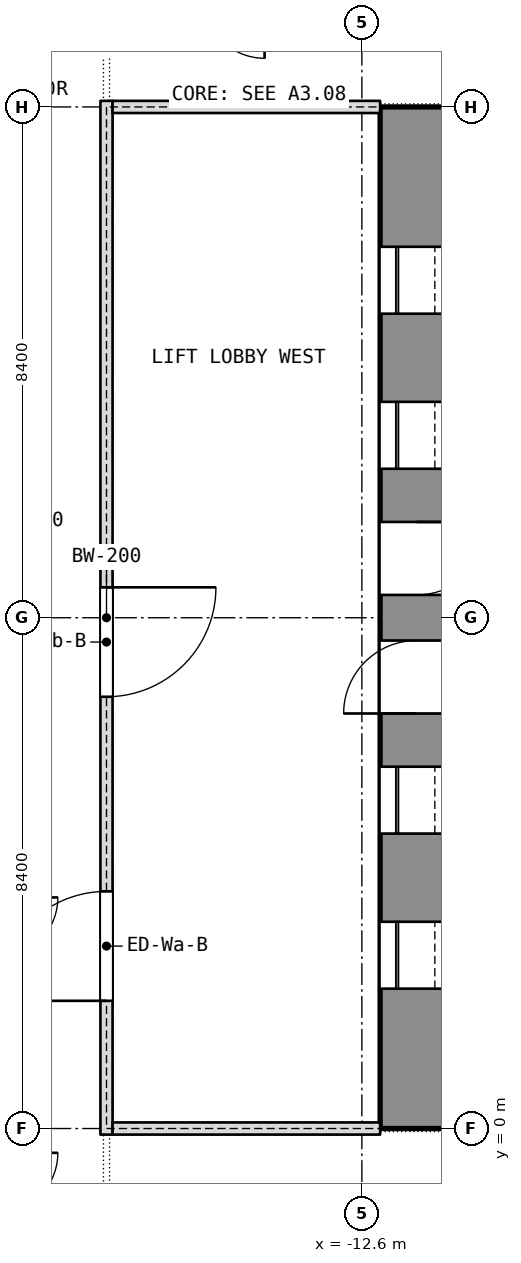
"""IFC4 building model, lengths in metres.
Left out: names, types, materials, properties, quantities, classifications, styles, units other than length and angle.
Written with IfcOpenShell. Run it as: python <this file> out.ifc"""

import sys

from ifc_helpers import new_model, si_unit, direction, frame, frame_2d, origin, place, context, subcontext, project, spatial, rectangle, extrude, element, fill, save


model = new_model("IFC4")
c1 = context("Model", 3, precision=1e-05, world=origin(), true_north=direction((0.0, 1.0)))
c2 = subcontext(c1, "Body", "Model", "MODEL_VIEW")
j1 = project(units=[si_unit("LENGTHUNIT", "METRE"), si_unit("PLANEANGLEUNIT", "RADIAN")], contexts=[c1])
p1 = place(None, origin())
s1 = spatial("IfcSite", under=j1, at=p1, CompositionType="ELEMENT")
p2 = place(p1, origin())
s2 = spatial("IfcBuilding", under=s1, at=p2, CompositionType="ELEMENT")
p3 = place(p2, frame((0.0, 0.0, 61.7)))
s3 = spatial("IfcBuildingStorey", under=s2, at=p3, CompositionType="ELEMENT", Elevation=61.7)
p4 = place(p3, frame((-11.7, 0.0, 0.0), z_axis=(0.0, 0.0, 1.0), x_axis=(0.0, 1.0, 0.0)))
e1 = element("IfcWall", 1, at=p4, inside=s3, PredefinedType="SHEAR", context=c2, shape_type="SweptSolid", body=[
    extrude(rectangle(XDim=16.8, YDim=1.2, at=frame_2d((8.4, 0.0))), origin(), (0.0, 0.0, 1.0), 3.6),
])
p5 = place(p4, frame((2.3, 0.0, 0.0)))
e2 = element("IfcOpeningElement", 2, at=p5, cuts=e1, PredefinedType="OPENING", context=c2, shape_type="SweptSolid", body=[
    extrude(rectangle(XDim=1.1, YDim=2.1, at=frame_2d((0.55, 1.05))), frame((0.0, 0.6, 0.0), z_axis=(0.0, -1.0, 0.0), x_axis=(1.0, 0.0, 0.0)), (0.0, 0.0, 1.0), 1.2),
])
p6 = place(p4, frame((4.85, 0.0, 0.0)))
e3 = element("IfcOpeningElement", 3, at=p6, cuts=e1, PredefinedType="OPENING", context=c2, shape_type="SweptSolid", body=[
    extrude(rectangle(XDim=1.1, YDim=2.1, at=frame_2d((0.55, 1.05))), frame((0.0, 0.6, 0.0), z_axis=(0.0, -1.0, 0.0), x_axis=(1.0, 0.0, 0.0)), (0.0, 0.0, 1.0), 1.2),
])
p7 = place(p4, frame((6.825, 0.0, 0.0)))
e4 = element("IfcOpeningElement", 4, at=p7, cuts=e1, PredefinedType="OPENING", context=c2, shape_type="SweptSolid", body=[
    extrude(rectangle(XDim=1.2, YDim=2.1, at=frame_2d((0.6, 1.05))), frame((0.0, 0.6, 0.0), z_axis=(0.0, -1.0, 0.0), x_axis=(1.0, 0.0, 0.0)), (0.0, 0.0, 1.0), 1.2),
])
p8 = place(p4, frame((13.4, 0.0, 0.0)))
e5 = element("IfcOpeningElement", 5, at=p8, cuts=e1, PredefinedType="OPENING", context=c2, shape_type="SweptSolid", body=[
    extrude(rectangle(XDim=1.1, YDim=2.1, at=frame_2d((0.55, 1.05))), frame((0.0, 0.6, 0.0), z_axis=(0.0, -1.0, 0.0), x_axis=(1.0, 0.0, 0.0)), (0.0, 0.0, 1.0), 1.2),
])
p9 = place(p4, frame((10.85, 0.0, 0.0)))
e6 = element("IfcOpeningElement", 6, at=p9, cuts=e1, PredefinedType="OPENING", context=c2, shape_type="SweptSolid", body=[
    extrude(rectangle(XDim=1.1, YDim=2.1, at=frame_2d((0.55, 1.05))), frame((0.0, 0.6, 0.0), z_axis=(0.0, -1.0, 0.0), x_axis=(1.0, 0.0, 0.0)), (0.0, 0.0, 1.0), 1.2),
])
p10 = place(p4, frame((8.775, 0.0, 0.0)))
e7 = element("IfcOpeningElement", 7, at=p10, cuts=e1, PredefinedType="OPENING", context=c2, shape_type="SweptSolid", body=[
    extrude(rectangle(XDim=1.2, YDim=2.1, at=frame_2d((0.6, 1.05))), frame((0.0, 0.6, 0.0), z_axis=(0.0, -1.0, 0.0), x_axis=(1.0, 0.0, 0.0)), (0.0, 0.0, 1.0), 1.2),
])
p11 = place(p3, frame((-16.8, -0.1, 0.0), z_axis=(0.0, 0.0, 1.0), x_axis=(0.0, 1.0, 0.0)))
e8 = element("IfcWall", 8, at=p11, inside=s3, PredefinedType="PARTITIONING", context=c2, shape_type="SweptSolid", body=[
    extrude(rectangle(XDim=17.0, YDim=0.2, at=frame_2d((8.5, 0.0))), origin(), (0.0, 0.0, 1.0), 3.34),
])
p12 = place(p11, frame((2.2, 0.0, 0.0)))
e9 = element("IfcOpeningElement", 9, at=p12, cuts=e8, PredefinedType="OPENING", context=c2, shape_type="SweptSolid", body=[
    extrude(rectangle(XDim=1.8, YDim=2.1, at=frame_2d((0.9, 1.05))), frame((0.0, 0.1, 0.0), z_axis=(0.0, -1.0, 0.0), x_axis=(1.0, 0.0, 0.0)), (0.0, 0.0, 1.0), 0.2),
])
p13 = place(p11, frame((7.2, 0.0, 0.0)))
e10 = element("IfcOpeningElement", 10, at=p13, cuts=e8, PredefinedType="OPENING", context=c2, shape_type="SweptSolid", body=[
    extrude(rectangle(XDim=1.8, YDim=2.1, at=frame_2d((0.9, 1.05))), frame((0.0, 0.1, 0.0), z_axis=(0.0, -1.0, 0.0), x_axis=(1.0, 0.0, 0.0)), (0.0, 0.0, 1.0), 0.2),
])
for number, where, z_axis, x_axis in (
    (11, (-16.7, 0.0, 0.0), (0.0, 0.0, 1.0), (1.0, 0.0, 0.0)),
    (12, (-16.7, 16.8, 0.0), (0.0, 0.0, 1.0), (1.0, 0.0, 0.0)),
):
    element("IfcWall", number, at=place(p3, frame(where, z_axis=z_axis, x_axis=x_axis)), inside=s3, PredefinedType="PARTITIONING", context=c2, shape_type="SweptSolid", body=[
        extrude(rectangle(XDim=4.4, YDim=0.2, at=frame_2d((2.2, 0.0))), origin(), (0.0, 0.0, 1.0), 2.84),
    ])
p14 = place(p5, origin())
e13 = element("IfcDoor", 13, at=p14, inside=s3, OperationType="SLIDING_TO_LEFT", PredefinedType="DOOR", context=c2, shape_type="SweptSolid", body=[
    extrude(rectangle(XDim=1.1, YDim=2.1, at=frame_2d((0.55, 1.05))), frame((0.0, 0.025, 0.0), z_axis=(0.0, -1.0, 0.0), x_axis=(1.0, 0.0, 0.0)), (0.0, 0.0, 1.0), 0.05),
])
fill(e2, e13)
p15 = place(p6, origin())
e14 = element("IfcDoor", 14, at=p15, inside=s3, OperationType="SLIDING_TO_LEFT", PredefinedType="DOOR", context=c2, shape_type="SweptSolid", body=[
    extrude(rectangle(XDim=1.1, YDim=2.1, at=frame_2d((0.55, 1.05))), frame((0.0, 0.025, 0.0), z_axis=(0.0, -1.0, 0.0), x_axis=(1.0, 0.0, 0.0)), (0.0, 0.0, 1.0), 0.05),
])
fill(e3, e14)
p16 = place(p7, origin())
e15 = element("IfcDoor", 15, at=p16, inside=s3, OperationType="SINGLE_SWING_LEFT", PredefinedType="DOOR", context=c2, shape_type="SweptSolid", body=[
    extrude(rectangle(XDim=1.2, YDim=2.1, at=frame_2d((0.6, 1.05))), frame((0.0, 0.025, 0.0), z_axis=(0.0, -1.0, 0.0), x_axis=(1.0, 0.0, 0.0)), (0.0, 0.0, 1.0), 0.05),
])
fill(e4, e15)
p17 = place(p8, origin())
e16 = element("IfcDoor", 16, at=p17, inside=s3, OperationType="SLIDING_TO_LEFT", PredefinedType="DOOR", context=c2, shape_type="SweptSolid", body=[
    extrude(rectangle(XDim=1.1, YDim=2.1, at=frame_2d((0.55, 1.05))), frame((0.0, 0.025, 0.0), z_axis=(0.0, -1.0, 0.0), x_axis=(1.0, 0.0, 0.0)), (0.0, 0.0, 1.0), 0.05),
])
fill(e5, e16)
p18 = place(p9, origin())
e17 = element("IfcDoor", 17, at=p18, inside=s3, OperationType="SLIDING_TO_LEFT", PredefinedType="DOOR", context=c2, shape_type="SweptSolid", body=[
    extrude(rectangle(XDim=1.1, YDim=2.1, at=frame_2d((0.55, 1.05))), frame((0.0, 0.025, 0.0), z_axis=(0.0, -1.0, 0.0), x_axis=(1.0, 0.0, 0.0)), (0.0, 0.0, 1.0), 0.05),
])
fill(e6, e17)
p19 = place(p10, origin())
e18 = element("IfcDoor", 18, at=p19, inside=s3, OperationType="SINGLE_SWING_LEFT", PredefinedType="DOOR", context=c2, shape_type="SweptSolid", body=[
    extrude(rectangle(XDim=1.2, YDim=2.1, at=frame_2d((0.6, 1.05))), frame((0.0, 0.025, 0.0), z_axis=(0.0, -1.0, 0.0), x_axis=(1.0, 0.0, 0.0)), (0.0, 0.0, 1.0), 0.05),
])
fill(e7, e18)
p20 = place(p12, origin())
e19 = element("IfcDoor", 19, at=p20, inside=s3, OperationType="DOUBLE_DOOR_SINGLE_SWING", PredefinedType="DOOR", context=c2, shape_type="SweptSolid", body=[
    extrude(rectangle(XDim=1.8, YDim=2.1, at=frame_2d((0.9, 1.05))), frame((0.0, 0.025, 0.0), z_axis=(0.0, -1.0, 0.0), x_axis=(1.0, 0.0, 0.0)), (0.0, 0.0, 1.0), 0.05),
])
fill(e9, e19)
p21 = place(p13, origin())
e20 = element("IfcDoor", 20, at=p21, inside=s3, OperationType="DOUBLE_DOOR_SINGLE_SWING", PredefinedType="DOOR", context=c2, shape_type="SweptSolid", body=[
    extrude(rectangle(XDim=1.8, YDim=2.1, at=frame_2d((0.9, 1.05))), frame((0.0, 0.025, 0.0), z_axis=(0.0, -1.0, 0.0), x_axis=(1.0, 0.0, 0.0)), (0.0, 0.0, 1.0), 0.05),
])
fill(e10, e20)
save(model, sys.argv[1])
